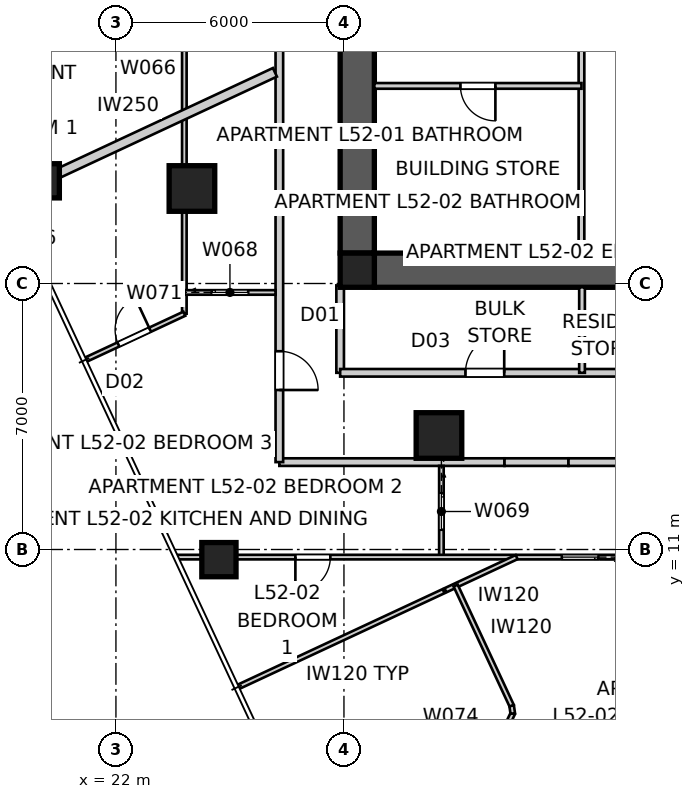
"""IFC4 building model, lengths in metres.
Left out: names, types, materials, properties, quantities, classifications, styles, units other than length and angle.
Written with IfcOpenShell. Run it as: python <this file> out.ifc"""

import sys

from ifc_helpers import new_model, si_unit, direction, frame, frame_2d, origin, origin_2d, place, context, subcontext, project, spatial, polyline, rectangle, outline, extrude, element, fill, save


model = new_model("IFC4")
c1 = context("Model", 3, precision=1e-05, world=origin(), true_north=direction((0.0, 1.0)))
c2 = subcontext(c1, "Body", "Model", "MODEL_VIEW")
j1 = project(units=[si_unit("LENGTHUNIT", "METRE"), si_unit("PLANEANGLEUNIT", "RADIAN")], contexts=[c1])
p1 = place(None, origin())
s1 = spatial("IfcSite", under=j1, at=p1, CompositionType="ELEMENT")
p2 = place(p1, origin())
s2 = spatial("IfcBuilding", under=s1, at=p2, CompositionType="ELEMENT")
p3 = place(p2, frame((0.0, 0.0, 189.6)))
s3 = spatial("IfcBuildingStorey", under=s2, at=p3, CompositionType="ELEMENT", Elevation=189.6)
p4 = place(p3, frame((51.2, 18.35, 0.0), z_axis=(0.0, 0.0, 1.0), x_axis=(-1.0, 0.0, 0.0)))
e1 = element("IfcWall", 1, at=p4, inside=s3, PredefinedType="SHEAR", context=c2, shape_type="SweptSolid", body=[
    extrude(outline(polyline([(0.0, -0.45), (22.4, -0.45), (22.4, -0.025), (22.85, -0.025), (22.85, 0.025), (22.4, 0.025), (22.4, 0.45), (0.0, 0.45), (0.0, 0.025), (-0.45, 0.025), (-0.45, -0.025), (0.0, -0.025), (0.0, -0.45)])), origin(), (0.0, 0.0, 1.0), 3.4),
])
p5 = place(p3, frame((28.35, 41.2, 0.0), z_axis=(0.0, 0.0, 1.0), x_axis=(0.0, -1.0, 0.0)))
e2 = element("IfcWall", 2, at=p5, inside=s3, PredefinedType="SHEAR", context=c2, shape_type="SweptSolid", body=[
    extrude(outline(polyline([(0.0, -0.45), (22.4, -0.45), (22.4, -0.025), (22.85, -0.025), (22.85, 0.025), (22.4, 0.025), (22.4, 0.45), (0.0, 0.45), (0.0, 0.025), (-0.45, 0.025), (-0.45, -0.025), (0.0, -0.025), (0.0, -0.45)])), origin(), (0.0, 0.0, 1.0), 3.4),
])
p6 = place(p5, frame((11.14, 0.0, 0.0)))
e3 = element("IfcOpeningElement", 3, at=p6, cuts=e2, PredefinedType="OPENING", context=c2, shape_type="SweptSolid", body=[
    extrude(rectangle(XDim=1.02, YDim=2.4, at=frame_2d((0.51, 1.2))), frame((0.0, 0.46, 0.0), z_axis=(0.0, -1.0, 0.0), x_axis=(1.0, 0.0, 0.0)), (0.0, 0.0, 1.0), 0.92),
])
for number, where, z_axis, x_axis in (
    (4, (28.35, 18.35, 0.0), (0.0, 0.0, 1.0), (1.0, 0.0, 0.0)),
    (5, (20.061, 20.702, 0.0), (0.0, 0.0, 1.0), (1.0, 0.0, 0.0)),
    (6, (24.71, 10.733, 0.0), (0.0, 0.0, 1.0), (1.0, 0.0, 0.0)),
):
    element("IfcColumn", number, at=place(p3, frame(where, z_axis=z_axis, x_axis=x_axis)), inside=s3, PredefinedType="COLUMN", context=c2, shape_type="SweptSolid", body=[
        extrude(rectangle(XDim=0.9, YDim=0.9, at=origin_2d()), origin(), (0.0, 0.0, 1.0), 3.4),
    ])
for number, where, z_axis, x_axis in (
    (7, (24.0, 20.5, 0.0), (0.0, 0.0, 1.0), (1.0, 0.0, 0.0)),
    (8, (30.5, 14.0, 0.0), (0.0, 0.0, 1.0), (1.0, 0.0, 0.0)),
):
    element("IfcColumn", number, at=place(p3, frame(where, z_axis=z_axis, x_axis=x_axis)), inside=s3, PredefinedType="COLUMN", context=c2, shape_type="SweptSolid", body=[
        extrude(rectangle(XDim=1.2, YDim=1.2, at=origin_2d()), origin(), (0.0, 0.0, 1.0), 3.4),
    ])
p7 = place(p3, frame((26.3, 13.3, 0.0), z_axis=(0.0, 0.0, 1.0), x_axis=(1.0, 0.0, 0.0)))
e9 = element("IfcWall", 9, at=p7, inside=s3, PredefinedType="PARTITIONING", context=c2, shape_type="SweptSolid", body=[
    extrude(rectangle(XDim=5.925, YDim=0.2, at=frame_2d((2.962, 0.0))), origin(), (0.0, 0.0, 1.0), 3.25),
])
p8 = place(p3, frame((32.225, 13.3, 0.0), z_axis=(0.0, 0.0, 1.0), x_axis=(1.0, 0.0, 0.0)))
e10 = element("IfcWall", 10, at=p8, inside=s3, PredefinedType="PARTITIONING", context=c2, shape_type="SweptSolid", body=[
    extrude(rectangle(XDim=1.684, YDim=0.2, at=frame_2d((0.842, 0.0))), origin(), (0.0, 0.0, 1.0), 2.55),
])
p9 = place(p3, frame((33.908, 13.3, 0.0), z_axis=(0.0, 0.0, 1.0), x_axis=(1.0, 0.0, 0.0)))
e11 = element("IfcWall", 11, at=p9, inside=s3, PredefinedType="PARTITIONING", context=c2, shape_type="SweptSolid", body=[
    extrude(rectangle(XDim=12.183, YDim=0.2, at=frame_2d((6.092, 0.0))), origin(), (0.0, 0.0, 1.0), 3.25),
])
p10 = place(p3, frame((26.3, 47.1, 0.0), z_axis=(0.0, 0.0, 1.0), x_axis=(0.0, -1.0, 0.0)))
e12 = element("IfcWall", 12, at=p10, inside=s3, PredefinedType="PARTITIONING", context=c2, shape_type="SweptSolid", body=[
    extrude(rectangle(XDim=33.8, YDim=0.2, at=frame_2d((16.9, 0.0))), origin(), (0.0, 0.0, 1.0), 3.25),
])
p11 = place(p10, frame((15.449, 0.0, 0.0)))
e13 = element("IfcOpeningElement", 13, at=p11, cuts=e12, PredefinedType="OPENING", context=c2, shape_type="SweptSolid", body=[
    extrude(rectangle(XDim=1.02, YDim=2.34, at=frame_2d((0.51, 1.17))), frame((0.0, 0.11, 0.0), z_axis=(0.0, -1.0, 0.0), x_axis=(1.0, 0.0, 0.0)), (0.0, 0.0, 1.0), 0.22),
])
p12 = place(p10, frame((30.883, 0.0, 0.0)))
e14 = element("IfcOpeningElement", 14, at=p12, cuts=e12, PredefinedType="OPENING", context=c2, shape_type="SweptSolid", body=[
    extrude(rectangle(XDim=1.02, YDim=2.34, at=frame_2d((0.51, 1.17))), frame((0.0, 0.11, 0.0), z_axis=(0.0, -1.0, 0.0), x_axis=(1.0, 0.0, 0.0)), (0.0, 0.0, 1.0), 0.22),
])
p13 = place(p3, frame((19.155, 20.28, 0.0), z_axis=(0.0, 0.0, 1.0), x_axis=(0.906308569177, 0.422616584432, 0.0)))
e15 = element("IfcWall", 15, at=p13, inside=s3, PredefinedType="PARTITIONING", context=c2, shape_type="SweptSolid", body=[
    extrude(rectangle(XDim=7.755, YDim=0.25, at=frame_2d((3.877, 0.0))), origin(), (0.0, 0.0, 1.0), 3.25),
])
p14 = place(p3, frame((34.25, 18.8, 0.0), z_axis=(0.0, 0.0, 1.0), x_axis=(0.0, 1.0, 0.0)))
e16 = element("IfcWall", 16, at=p14, inside=s3, PredefinedType="SOLIDWALL", context=c2, shape_type="SweptSolid", body=[
    extrude(rectangle(XDim=5.9, YDim=0.15, at=frame_2d((2.95, 0.0))), origin(), (0.0, 0.0, 1.0), 3.25),
])
p15 = place(p3, frame((34.25, 23.2, 0.0), z_axis=(0.0, 0.0, 1.0), x_axis=(-1.0, 0.0, 0.0)))
e17 = element("IfcWall", 17, at=p15, inside=s3, PredefinedType="SOLIDWALL", context=c2, shape_type="SweptSolid", body=[
    extrude(rectangle(XDim=5.45, YDim=0.15, at=frame_2d((2.725, 0.0))), origin(), (0.0, 0.0, 1.0), 3.25),
])
p16 = place(p15, frame((2.265, 0.0, 0.0)))
e18 = element("IfcOpeningElement", 18, at=p16, cuts=e17, PredefinedType="OPENING", context=c2, shape_type="SweptSolid", body=[
    extrude(rectangle(XDim=0.92, YDim=2.1, at=frame_2d((0.46, 1.05))), frame((0.0, 0.085, 0.0), z_axis=(0.0, -1.0, 0.0), x_axis=(1.0, 0.0, 0.0)), (0.0, 0.0, 1.0), 0.17),
])
p17 = place(p3, frame((27.9, 17.95, 0.0), z_axis=(0.0, 0.0, 1.0), x_axis=(0.0, -1.0, 0.0)))
e19 = element("IfcWall", 19, at=p17, inside=s3, PredefinedType="PARTITIONING", context=c2, shape_type="SweptSolid", body=[
    extrude(rectangle(XDim=2.3, YDim=0.2, at=frame_2d((1.15, 0.0))), origin(), (0.0, 0.0, 1.0), 3.25),
])
p18 = place(p3, frame((27.9, 15.65, 0.0), z_axis=(0.0, 0.0, 1.0), x_axis=(1.0, 0.0, 0.0)))
e20 = element("IfcWall", 20, at=p18, inside=s3, PredefinedType="PARTITIONING", context=c2, shape_type="SweptSolid", body=[
    extrude(rectangle(XDim=24.2, YDim=0.2, at=frame_2d((12.1, 0.0))), origin(), (0.0, 0.0, 1.0), 3.25),
])
p19 = place(p18, frame((10.743, 0.0, 0.0)))
e21 = element("IfcOpeningElement", 21, at=p19, cuts=e20, PredefinedType="OPENING", context=c2, shape_type="SweptSolid", body=[
    extrude(rectangle(XDim=1.02, YDim=2.1, at=frame_2d((0.51, 1.05))), frame((0.0, 0.11, 0.0), z_axis=(0.0, -1.0, 0.0), x_axis=(1.0, 0.0, 0.0)), (0.0, 0.0, 1.0), 0.22),
])
p20 = place(p18, frame((19.636, 0.0, 0.0)))
e22 = element("IfcOpeningElement", 22, at=p20, cuts=e20, PredefinedType="OPENING", context=c2, shape_type="SweptSolid", body=[
    extrude(rectangle(XDim=1.02, YDim=2.1, at=frame_2d((0.51, 1.05))), frame((0.0, 0.11, 0.0), z_axis=(0.0, -1.0, 0.0), x_axis=(1.0, 0.0, 0.0)), (0.0, 0.0, 1.0), 0.22),
])
p21 = place(p18, frame((3.297, 0.0, 0.0)))
e23 = element("IfcOpeningElement", 23, at=p21, cuts=e20, PredefinedType="OPENING", context=c2, shape_type="SweptSolid", body=[
    extrude(rectangle(XDim=1.02, YDim=2.1, at=frame_2d((0.51, 1.05))), frame((0.0, 0.11, 0.0), z_axis=(0.0, -1.0, 0.0), x_axis=(1.0, 0.0, 0.0)), (0.0, 0.0, 1.0), 0.22),
])
p22 = place(p3, frame((34.265, 15.65, 0.0), z_axis=(0.0, 0.0, 1.0), x_axis=(0.0, 1.0, 0.0)))
e24 = element("IfcWall", 24, at=p22, inside=s3, PredefinedType="SOLIDWALL", context=c2, shape_type="SweptSolid", body=[
    extrude(rectangle(XDim=2.25, YDim=0.15, at=frame_2d((1.125, 0.0))), origin(), (0.0, 0.0, 1.0), 2.796),
])
p23 = place(p3, frame((23.8, 17.205, 0.0), z_axis=(0.0, 0.0, 1.0), x_axis=(0.0, 1.0, 0.0)))
e25 = element("IfcWall", 25, at=p23, inside=s3, PredefinedType="PARTITIONING", context=c2, shape_type="SweptSolid", body=[
    extrude(rectangle(XDim=30.574, YDim=0.12, at=frame_2d((15.287, 0.0))), origin(), (0.0, 0.0, 1.0), 2.55),
])
p24 = place(p23, frame((12.857, 0.0, 0.0)))
e26 = element("IfcOpeningElement", 26, at=p24, cuts=e25, PredefinedType="OPENING", context=c2, shape_type="SweptSolid", body=[
    extrude(rectangle(XDim=0.92, YDim=2.34, at=frame_2d((0.46, 1.17))), frame((0.0, 0.07, 0.0), z_axis=(0.0, -1.0, 0.0), x_axis=(1.0, 0.0, 0.0)), (0.0, 0.0, 1.0), 0.14),
])
p25 = place(p23, frame((28.042, 0.0, 0.0)))
e27 = element("IfcOpeningElement", 27, at=p25, cuts=e25, PredefinedType="OPENING", context=c2, shape_type="SweptSolid", body=[
    extrude(rectangle(XDim=0.92, YDim=2.34, at=frame_2d((0.46, 1.17))), frame((0.0, 0.07, 0.0), z_axis=(0.0, -1.0, 0.0), x_axis=(1.0, 0.0, 0.0)), (0.0, 0.0, 1.0), 0.14),
])
p26 = place(p23, frame((20.655, 0.0, 0.0)))
e28 = element("IfcOpeningElement", 28, at=p26, cuts=e25, PredefinedType="OPENING", context=c2, shape_type="SweptSolid", body=[
    extrude(rectangle(XDim=0.96, YDim=2.1, at=frame_2d((0.48, 1.05))), frame((0.0, 0.07, 0.0), z_axis=(0.0, -1.0, 0.0), x_axis=(1.0, 0.0, 0.0)), (0.0, 0.0, 1.0), 0.14),
])
p27 = place(p3, frame((23.8, 17.765, 0.0), z_axis=(0.0, 0.0, 1.0), x_axis=(1.0, 0.0, 0.0)))
e29 = element("IfcWall", 29, at=p27, inside=s3, PredefinedType="PARTITIONING", context=c2, shape_type="SweptSolid", body=[
    extrude(rectangle(XDim=2.4, YDim=0.12, at=frame_2d((1.2, 0.0))), origin(), (0.0, 0.0, 1.0), 3.25),
])
p28 = place(p27, frame((0.72, 0.0, 0.0)))
e30 = element("IfcOpeningElement", 30, at=p28, cuts=e29, PredefinedType="OPENING", context=c2, shape_type="SweptSolid", body=[
    extrude(rectangle(XDim=0.96, YDim=2.1, at=frame_2d((0.48, 1.05))), frame((0.0, 0.07, 0.0), z_axis=(0.0, -1.0, 0.0), x_axis=(1.0, 0.0, 0.0)), (0.0, 0.0, 1.0), 0.14),
])
p29 = place(p3, frame((30.564, 13.2, 0.0), z_axis=(0.0, 0.0, 1.0), x_axis=(0.0, -1.0, 0.0)))
e31 = element("IfcWall", 31, at=p29, inside=s3, PredefinedType="PARTITIONING", context=c2, shape_type="SweptSolid", body=[
    extrude(rectangle(XDim=2.4, YDim=0.12, at=frame_2d((1.2, 0.0))), origin(), (0.0, 0.0, 1.0), 3.25),
])
p30 = place(p29, frame((0.72, 0.0, 0.0)))
e32 = element("IfcOpeningElement", 32, at=p30, cuts=e31, PredefinedType="OPENING", context=c2, shape_type="SweptSolid", body=[
    extrude(rectangle(XDim=0.96, YDim=2.1, at=frame_2d((0.48, 1.05))), frame((0.0, 0.07, 0.0), z_axis=(0.0, -1.0, 0.0), x_axis=(1.0, 0.0, 0.0)), (0.0, 0.0, 1.0), 0.14),
])
p31 = place(p3, frame((53.208, 10.8, 0.0), z_axis=(0.0, 0.0, 1.0), x_axis=(-1.0, 0.0, 0.0)))
e33 = element("IfcWall", 33, at=p31, inside=s3, PredefinedType="PARTITIONING", context=c2, shape_type="SweptSolid", body=[
    extrude(rectangle(XDim=29.593, YDim=0.12, at=frame_2d((14.796, 0.0))), origin(), (0.0, 0.0, 1.0), 3.25),
])
p32 = place(p31, frame((6.074, 0.0, 0.0)))
e34 = element("IfcOpeningElement", 34, at=p32, cuts=e33, PredefinedType="OPENING", context=c2, shape_type="SweptSolid", body=[
    extrude(rectangle(XDim=0.92, YDim=2.34, at=frame_2d((0.46, 1.17))), frame((0.0, 0.07, 0.0), z_axis=(0.0, -1.0, 0.0), x_axis=(1.0, 0.0, 0.0)), (0.0, 0.0, 1.0), 0.14),
])
p33 = place(p31, frame((25.566, 0.0, 0.0)))
e35 = element("IfcOpeningElement", 35, at=p33, cuts=e33, PredefinedType="OPENING", context=c2, shape_type="SweptSolid", body=[
    extrude(rectangle(XDim=0.92, YDim=2.34, at=frame_2d((0.46, 1.17))), frame((0.0, 0.07, 0.0), z_axis=(0.0, -1.0, 0.0), x_axis=(1.0, 0.0, 0.0)), (0.0, 0.0, 1.0), 0.14),
])
p34 = place(p31, frame((18.515, 0.0, 0.0)))
e36 = element("IfcOpeningElement", 36, at=p34, cuts=e33, PredefinedType="OPENING", context=c2, shape_type="SweptSolid", body=[
    extrude(rectangle(XDim=0.96, YDim=2.1, at=frame_2d((0.48, 1.05))), frame((0.0, 0.07, 0.0), z_axis=(0.0, -1.0, 0.0), x_axis=(1.0, 0.0, 0.0)), (0.0, 0.0, 1.0), 0.14),
])
p35 = place(p31, frame((15.493, 0.0, 0.0)))
e37 = element("IfcOpeningElement", 37, at=p35, cuts=e33, PredefinedType="OPENING", context=c2, shape_type="SweptSolid", body=[
    extrude(rectangle(XDim=0.96, YDim=2.1, at=frame_2d((0.48, 1.05))), frame((0.0, 0.07, 0.0), z_axis=(0.0, -1.0, 0.0), x_axis=(1.0, 0.0, 0.0)), (0.0, 0.0, 1.0), 0.14),
])
p36 = place(p31, frame((11.609, 0.0, 0.0)))
e38 = element("IfcOpeningElement", 38, at=p36, cuts=e33, PredefinedType="OPENING", context=c2, shape_type="SweptSolid", body=[
    extrude(rectangle(XDim=0.96, YDim=2.1, at=frame_2d((0.48, 1.05))), frame((0.0, 0.07, 0.0), z_axis=(0.0, -1.0, 0.0), x_axis=(1.0, 0.0, 0.0)), (0.0, 0.0, 1.0), 0.14),
])
p37 = place(p3, frame((21.199, 15.992, 0.0), z_axis=(0.0, 0.0, 1.0), x_axis=(0.906291760669, 0.422652628697, 0.0)))
e39 = element("IfcWall", 39, at=p37, inside=s3, PredefinedType="PARTITIONING", context=c2, shape_type="SweptSolid", body=[
    extrude(rectangle(XDim=2.87, YDim=0.12, at=frame_2d((1.435, 0.0))), origin(), (0.0, 0.0, 1.0), 3.25),
])
p38 = place(p37, frame((0.955, 0.0, 0.0)))
e40 = element("IfcOpeningElement", 40, at=p38, cuts=e39, PredefinedType="OPENING", context=c2, shape_type="SweptSolid", body=[
    extrude(rectangle(XDim=0.92, YDim=2.34, at=frame_2d((0.46, 1.17))), frame((0.0, 0.07, 0.0), z_axis=(0.0, -1.0, 0.0), x_axis=(1.0, 0.0, 0.0)), (0.0, 0.0, 1.0), 0.14),
])
p39 = place(p3, frame((30.671, 9.927, 0.0), z_axis=(0.0, 0.0, 1.0), x_axis=(0.906306821634, 0.422620332048, 0.0)))
e41 = element("IfcWall", 41, at=p39, inside=s3, PredefinedType="PARTITIONING", context=c2, shape_type="SweptSolid", body=[
    extrude(rectangle(XDim=2.067, YDim=0.12, at=frame_2d((1.033, 0.0))), origin(), (0.0, 0.0, 1.0), 3.25),
])
p40 = place(p3, frame((32.311, 6.41, 0.0), z_axis=(0.0, 0.0, 1.0), x_axis=(0.432992694072, 0.901397430039, 0.0)))
e42 = element("IfcWall", 42, at=p40, inside=s3, PredefinedType="PARTITIONING", context=c2, shape_type="SweptSolid", body=[
    extrude(rectangle(XDim=0.303, YDim=0.12, at=frame_2d((0.152, 0.0))), origin(), (0.0, 0.0, 1.0), 3.25),
])
p41 = place(p3, frame((32.442, 6.684, 0.0), z_axis=(0.0, 0.0, 1.0), x_axis=(-0.1412579154, 0.989972828585, 0.0)))
e43 = element("IfcWall", 43, at=p41, inside=s3, PredefinedType="PARTITIONING", context=c2, shape_type="SweptSolid", body=[
    extrude(rectangle(XDim=0.209, YDim=0.12, at=frame_2d((0.104, 0.0))), origin(), (0.0, 0.0, 1.0), 3.25),
])
p42 = place(p3, frame((32.413, 6.891, 0.0), z_axis=(0.0, 0.0, 1.0), x_axis=(-0.422628673033, 0.906302932099, 0.0)))
e44 = element("IfcWall", 44, at=p42, inside=s3, PredefinedType="PARTITIONING", context=c2, shape_type="SweptSolid", body=[
    extrude(rectangle(XDim=3.487, YDim=0.12, at=frame_2d((1.744, 0.0))), origin(), (0.0, 0.0, 1.0), 3.25),
])
p43 = place(p3, frame((30.622, 9.904, 0.0), z_axis=(0.0, 0.0, 1.0), x_axis=(-0.906317929608, -0.422596510244, 0.0)))
e45 = element("IfcWall", 45, at=p43, inside=s3, PredefinedType="PARTITIONING", context=c2, shape_type="SweptSolid", body=[
    extrude(rectangle(XDim=5.967, YDim=0.12, at=frame_2d((2.984, 0.0))), origin(), (0.0, 0.0, 1.0), 3.25),
])
p44 = place(p21, origin())
e46 = element("IfcDoor", 46, at=p44, inside=s3, OperationType="SINGLE_SWING_RIGHT", PredefinedType="DOOR", context=c2, shape_type="SweptSolid", body=[
    extrude(rectangle(XDim=1.02, YDim=2.1, at=frame_2d((0.51, 1.05))), frame((0.0, 0.025, 0.0), z_axis=(0.0, -1.0, 0.0), x_axis=(1.0, 0.0, 0.0)), (0.0, 0.0, 1.0), 0.05),
])
fill(e23, e46)
p45 = place(p12, origin())
e47 = element("IfcDoor", 47, at=p45, inside=s3, OperationType="SINGLE_SWING_RIGHT", PredefinedType="DOOR", context=c2, shape_type="SweptSolid", body=[
    extrude(rectangle(XDim=1.02, YDim=2.34, at=frame_2d((0.51, 1.17))), frame((0.0, 0.025, 0.0), z_axis=(0.0, -1.0, 0.0), x_axis=(1.0, 0.0, 0.0)), (0.0, 0.0, 1.0), 0.05),
])
fill(e14, e47)
p46 = place(p16, origin())
e48 = element("IfcDoor", 48, at=p46, inside=s3, OperationType="SINGLE_SWING_LEFT", PredefinedType="DOOR", context=c2, shape_type="SweptSolid", body=[
    extrude(rectangle(XDim=0.92, YDim=2.1, at=frame_2d((0.46, 1.05))), frame((0.0, 0.025, 0.0), z_axis=(0.0, -1.0, 0.0), x_axis=(1.0, 0.0, 0.0)), (0.0, 0.0, 1.0), 0.05),
])
fill(e18, e48)
p47 = place(p33, origin())
e49 = element("IfcDoor", 49, at=p47, inside=s3, OperationType="SINGLE_SWING_RIGHT", PredefinedType="DOOR", context=c2, shape_type="SweptSolid", body=[
    extrude(rectangle(XDim=0.92, YDim=2.34, at=frame_2d((0.46, 1.17))), frame((0.0, 0.025, 0.0), z_axis=(0.0, -1.0, 0.0), x_axis=(1.0, 0.0, 0.0)), (0.0, 0.0, 1.0), 0.05),
])
fill(e35, e49)
p48 = place(p38, origin())
e50 = element("IfcDoor", 50, at=p48, inside=s3, OperationType="SINGLE_SWING_RIGHT", PredefinedType="DOOR", context=c2, shape_type="SweptSolid", body=[
    extrude(rectangle(XDim=0.92, YDim=2.34, at=frame_2d((0.46, 1.17))), frame((0.0, 0.025, 0.0), z_axis=(0.0, -1.0, 0.0), x_axis=(1.0, 0.0, 0.0)), (0.0, 0.0, 1.0), 0.05),
])
fill(e40, e50)
p49 = place(p28, origin())
e51 = element("IfcDoor", 51, at=p49, inside=s3, OperationType="SLIDING_TO_LEFT", PredefinedType="DOOR", context=c2, shape_type="SweptSolid", body=[
    extrude(rectangle(XDim=0.96, YDim=2.1, at=frame_2d((0.48, 1.05))), frame((0.0, 0.025, 0.0), z_axis=(0.0, -1.0, 0.0), x_axis=(1.0, 0.0, 0.0)), (0.0, 0.0, 1.0), 0.05),
])
fill(e30, e51)
p50 = place(p30, origin())
e52 = element("IfcDoor", 52, at=p50, inside=s3, OperationType="SLIDING_TO_LEFT", PredefinedType="DOOR", context=c2, shape_type="SweptSolid", body=[
    extrude(rectangle(XDim=0.96, YDim=2.1, at=frame_2d((0.48, 1.05))), frame((0.0, 0.025, 0.0), z_axis=(0.0, -1.0, 0.0), x_axis=(1.0, 0.0, 0.0)), (0.0, 0.0, 1.0), 0.05),
])
fill(e32, e52)
p51 = place(p34, origin())
e53 = element("IfcDoor", 53, at=p51, inside=s3, OperationType="SLIDING_TO_LEFT", PredefinedType="DOOR", context=c2, shape_type="SweptSolid", body=[
    extrude(rectangle(XDim=0.96, YDim=2.1, at=frame_2d((0.48, 1.05))), frame((0.0, 0.025, 0.0), z_axis=(0.0, -1.0, 0.0), x_axis=(1.0, 0.0, 0.0)), (0.0, 0.0, 1.0), 0.05),
])
fill(e36, e53)
save(model, sys.argv[1])
